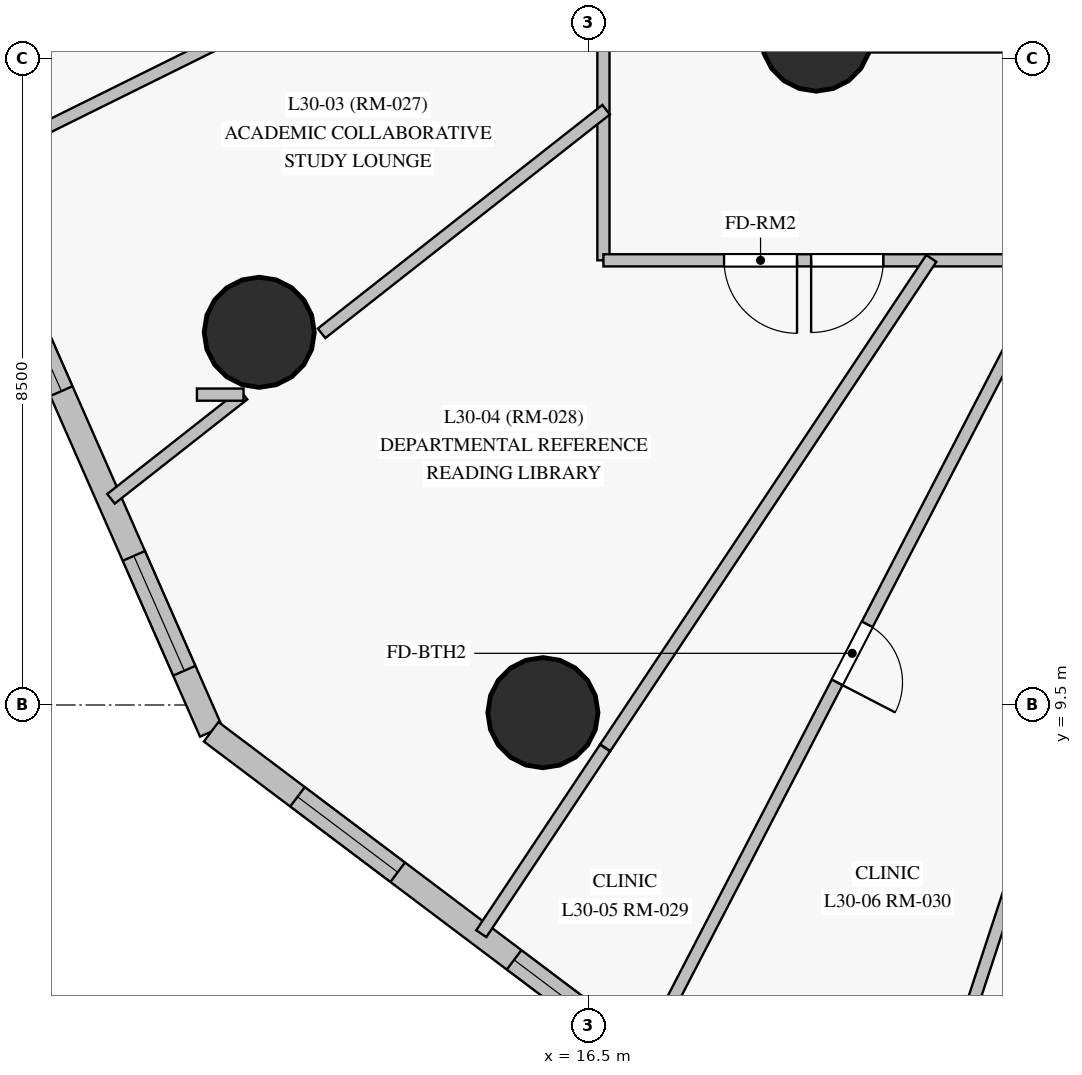
"""IFC4 building model, lengths in metres.
Left out: names, types, materials, properties, quantities, classifications, styles, units other than length and angle.
Written with IfcOpenShell. Run it as: python <this file> out.ifc"""

import sys

from ifc_helpers import new_model, si_unit, direction, frame, frame_2d, origin, origin_with_axes, origin_2d, place, context, subcontext, project, spatial, rectangle, circle, extrude, source, transform, mapped, element, fill, save


model = new_model("IFC4")
c1 = context("Model", 3, precision=1e-05, world=origin(), true_north=direction((0.0, 1.0)))
c2 = subcontext(c1, "Body", "Model", "MODEL_VIEW")
j1 = project(units=[si_unit("LENGTHUNIT", "METRE"), si_unit("PLANEANGLEUNIT", "RADIAN")], contexts=[c1])
p1 = place(None, origin())
s1 = spatial("IfcSite", under=j1, at=p1, CompositionType="ELEMENT")
p2 = place(p1, origin())
s2 = spatial("IfcBuilding", under=s1, at=p2, CompositionType="ELEMENT")
p3 = place(p2, frame((0.0, 0.0, 111.45)))
s3 = spatial("IfcBuildingStorey", under=s2, at=p3, CompositionType="ELEMENT", Elevation=111.45)
m1 = source(origin_with_axes(), c2, "Body", "SweptSolid", [
    extrude(circle(Radius=0.725, at=origin_2d()), origin(), (0.0, 0.0, 1.0), 3.05),
])
for number, where, z_axis, x_axis in (
    (1, (19.5, 18.3, 0.0), (0.0, 0.0, 1.0), (1.0, 0.0, 0.0)),
    (2, (12.172, 14.403, 0.0), (0.0, 0.0, 1.0), (1.0, 0.0, 0.0)),
    (3, (15.904, 9.399, 0.0), (0.0, 0.0, 1.0), (1.0, 0.0, 0.0)),
):
    element("IfcColumn", number, at=place(p3, frame(where, z_axis=z_axis, x_axis=x_axis)), inside=s3, PredefinedType="COLUMN", context=c2, shape_type="MappedRepresentation", body=[
        mapped(m1, transform((0.0, 0.0, 0.0), scale=1.0)),
    ])
p4 = place(p3, frame((7.619, 18.066, 0.0), z_axis=(0.0, 0.0, 1.0), x_axis=(0.402458923795, -0.915438045232, 0.0)))
e4 = element("IfcWall", 4, at=p4, inside=s3, PredefinedType="SOLIDWALL", context=c2, shape_type="SweptSolid", body=[
    extrude(rectangle(XDim=9.742, YDim=0.32, at=frame_2d((4.871, 0.0))), origin(), (0.0, 0.0, 1.0), 2.825),
])
p5 = place(p4, frame((3.197, 0.0, 0.85)))
e5 = element("IfcOpeningElement", 5, at=p5, cuts=e4, PredefinedType="OPENING", context=c2, shape_type="SweptSolid", body=[
    extrude(rectangle(XDim=1.65, YDim=1.65, at=frame_2d((0.825, 0.825))), frame((0.0, 0.17, 0.0), z_axis=(0.0, -1.0, 0.0), x_axis=(1.0, 0.0, 0.0)), (0.0, 0.0, 1.0), 0.34),
])
p6 = place(p4, frame((7.214, 0.0, 0.85)))
e6 = element("IfcOpeningElement", 6, at=p6, cuts=e4, PredefinedType="OPENING", context=c2, shape_type="SweptSolid", body=[
    extrude(rectangle(XDim=1.65, YDim=1.65, at=frame_2d((0.825, 0.825))), frame((0.0, 0.17, 0.0), z_axis=(0.0, -1.0, 0.0), x_axis=(1.0, 0.0, 0.0)), (0.0, 0.0, 1.0), 0.34),
])
p7 = place(p3, frame((11.539, 9.148, 0.0), z_axis=(0.0, 0.0, 1.0), x_axis=(0.798890081763, -0.601477046329, 0.0)))
e7 = element("IfcWall", 7, at=p7, inside=s3, PredefinedType="SOLIDWALL", context=c2, shape_type="SweptSolid", body=[
    extrude(rectangle(XDim=7.003, YDim=0.32, at=frame_2d((3.502, 0.0))), origin(), (0.0, 0.0, 1.0), 2.825),
])
p8 = place(p7, frame((1.422, 0.0, 0.85)))
e8 = element("IfcOpeningElement", 8, at=p8, cuts=e7, PredefinedType="OPENING", context=c2, shape_type="SweptSolid", body=[
    extrude(rectangle(XDim=1.65, YDim=1.65, at=frame_2d((0.825, 0.825))), frame((0.0, 0.17, 0.0), z_axis=(0.0, -1.0, 0.0), x_axis=(1.0, 0.0, 0.0)), (0.0, 0.0, 1.0), 0.34),
])
p9 = place(p7, frame((4.989, 0.0, 0.85)))
e9 = element("IfcOpeningElement", 9, at=p9, cuts=e7, PredefinedType="OPENING", context=c2, shape_type="SweptSolid", body=[
    extrude(rectangle(XDim=1.4, YDim=1.65, at=frame_2d((0.7, 0.825))), frame((0.0, 0.17, 0.0), z_axis=(0.0, -1.0, 0.0), x_axis=(1.0, 0.0, 0.0)), (0.0, 0.0, 1.0), 0.34),
])
p10 = place(p3, frame((17.134, 4.935, 0.0), z_axis=(0.0, 0.0, 1.0), x_axis=(0.996451131553, 0.084173288083, 0.0)))
e10 = element("IfcWall", 10, at=p10, inside=s3, PredefinedType="SOLIDWALL", context=c2, shape_type="SweptSolid", body=[
    extrude(rectangle(XDim=17.269, YDim=0.32, at=frame_2d((8.635, 0.0))), origin(), (0.0, 0.0, 1.0), 2.825),
])
p11 = place(p10, frame((1.446, 0.0, 0.85)))
e11 = element("IfcOpeningElement", 11, at=p11, cuts=e10, PredefinedType="OPENING", context=c2, shape_type="SweptSolid", body=[
    extrude(rectangle(XDim=1.65, YDim=1.65, at=frame_2d((0.825, 0.825))), frame((0.0, 0.17, 0.0), z_axis=(0.0, -1.0, 0.0), x_axis=(1.0, 0.0, 0.0)), (0.0, 0.0, 1.0), 0.34),
])
p12 = place(p10, frame((5.47, 0.0, 0.85)))
e12 = element("IfcOpeningElement", 12, at=p12, cuts=e10, PredefinedType="OPENING", context=c2, shape_type="SweptSolid", body=[
    extrude(rectangle(XDim=1.65, YDim=1.65, at=frame_2d((0.825, 0.825))), frame((0.0, 0.17, 0.0), z_axis=(0.0, -1.0, 0.0), x_axis=(1.0, 0.0, 0.0)), (0.0, 0.0, 1.0), 0.34),
])
p13 = place(p10, frame((15.305, 0.0, 0.0)))
e13 = element("IfcOpeningElement", 13, at=p13, cuts=e10, PredefinedType="OPENING", context=c2, shape_type="SweptSolid", body=[
    extrude(rectangle(XDim=1.05, YDim=2.12, at=frame_2d((0.525, 1.06))), frame((0.0, 0.17, 0.0), z_axis=(0.0, -1.0, 0.0), x_axis=(1.0, 0.0, 0.0)), (0.0, 0.0, 1.0), 0.34),
])
p14 = place(p3, frame((16.7, 15.35, 0.0), z_axis=(0.0, 0.0, 1.0), x_axis=(0.0, 1.0, 0.0)))
e14 = element("IfcWall", 14, at=p14, inside=s3, PredefinedType="PARTITIONING", context=c2, shape_type="SweptSolid", body=[
    extrude(rectangle(XDim=22.3, YDim=0.16, at=frame_2d((11.15, 0.0))), origin(), (0.0, 0.0, 1.0), 2.225),
])
p15 = place(p14, frame((10.635, 0.0, 0.0)))
e15 = element("IfcOpeningElement", 15, at=p15, cuts=e14, PredefinedType="OPENING", context=c2, shape_type="SweptSolid", body=[
    extrude(rectangle(XDim=0.95, YDim=2.15, at=frame_2d((0.475, 1.075))), frame((0.0, 0.09, 0.0), z_axis=(0.0, -1.0, 0.0), x_axis=(1.0, 0.0, 0.0)), (0.0, 0.0, 1.0), 0.18),
])
p16 = place(p14, frame((5.64, 0.0, 0.0)))
e16 = element("IfcOpeningElement", 16, at=p16, cuts=e14, PredefinedType="OPENING", context=c2, shape_type="SweptSolid", body=[
    extrude(rectangle(XDim=0.96, YDim=2.15, at=frame_2d((0.48, 1.075))), frame((0.0, 0.09, 0.0), z_axis=(0.0, -1.0, 0.0), x_axis=(1.0, 0.0, 0.0)), (0.0, 0.0, 1.0), 0.18),
])
p17 = place(p14, frame((3.071, 0.0, 0.0)))
e17 = element("IfcOpeningElement", 17, at=p17, cuts=e14, PredefinedType="OPENING", context=c2, shape_type="SweptSolid", body=[
    extrude(rectangle(XDim=0.95, YDim=2.15, at=frame_2d((0.475, 1.075))), frame((0.0, 0.09, 0.0), z_axis=(0.0, -1.0, 0.0), x_axis=(1.0, 0.0, 0.0)), (0.0, 0.0, 1.0), 0.18),
])
p18 = place(p14, frame((16.25, 0.0, 0.0)))
e18 = element("IfcOpeningElement", 18, at=p18, cuts=e14, PredefinedType="OPENING", context=c2, shape_type="SweptSolid", body=[
    extrude(rectangle(XDim=0.95, YDim=2.15, at=frame_2d((0.475, 1.075))), frame((0.0, 0.09, 0.0), z_axis=(0.0, -1.0, 0.0), x_axis=(1.0, 0.0, 0.0)), (0.0, 0.0, 1.0), 0.18),
])
p19 = place(p14, frame((14.02, 0.0, 0.0)))
e19 = element("IfcOpeningElement", 19, at=p19, cuts=e14, PredefinedType="OPENING", context=c2, shape_type="SweptSolid", body=[
    extrude(rectangle(XDim=0.96, YDim=2.15, at=frame_2d((0.48, 1.075))), frame((0.0, 0.09, 0.0), z_axis=(0.0, -1.0, 0.0), x_axis=(1.0, 0.0, 0.0)), (0.0, 0.0, 1.0), 0.18),
])
p20 = place(p3, frame((22.667, 15.377, 0.0), z_axis=(0.0, 0.0, 1.0), x_axis=(-0.460195420674, -0.887817647262, 0.0)))
e20 = element("IfcWall", 20, at=p20, inside=s3, PredefinedType="PARTITIONING", context=c2, shape_type="SweptSolid", body=[
    extrude(rectangle(XDim=11.708, YDim=0.16, at=frame_2d((5.854, 0.0))), origin(), (0.0, 0.0, 1.0), 2.825),
])
p21 = place(p20, frame((5.424, 0.0, 0.0)))
e21 = element("IfcOpeningElement", 21, at=p21, cuts=e20, PredefinedType="OPENING", context=c2, shape_type="SweptSolid", body=[
    extrude(rectangle(XDim=0.86, YDim=2.04, at=frame_2d((0.43, 1.02))), frame((0.0, 0.09, 0.0), z_axis=(0.0, -1.0, 0.0), x_axis=(1.0, 0.0, 0.0)), (0.0, 0.0, 1.0), 0.18),
])
p22 = place(p3, frame((27.55, 15.35, 0.0), z_axis=(0.0, 0.0, 1.0), x_axis=(-1.0, 0.0, 0.0)))
e22 = element("IfcWall", 22, at=p22, inside=s3, PredefinedType="PARTITIONING", context=c2, shape_type="SweptSolid", body=[
    extrude(rectangle(XDim=10.85, YDim=0.16, at=frame_2d((5.425, 0.0))), origin(), (0.0, 0.0, 1.0), 2.325),
])
p23 = place(p22, frame((7.167, 0.0, 0.0)))
e23 = element("IfcOpeningElement", 23, at=p23, cuts=e22, PredefinedType="OPENING", context=c2, shape_type="SweptSolid", body=[
    extrude(rectangle(XDim=0.95, YDim=2.15, at=frame_2d((0.475, 1.075))), frame((0.0, 0.09, 0.0), z_axis=(0.0, -1.0, 0.0), x_axis=(1.0, 0.0, 0.0)), (0.0, 0.0, 1.0), 0.18),
])
p24 = place(p22, frame((3.71, 0.0, 0.0)))
e24 = element("IfcOpeningElement", 24, at=p24, cuts=e22, PredefinedType="OPENING", context=c2, shape_type="SweptSolid", body=[
    extrude(rectangle(XDim=0.95, YDim=2.15, at=frame_2d((0.475, 1.075))), frame((0.0, 0.09, 0.0), z_axis=(0.0, -1.0, 0.0), x_axis=(1.0, 0.0, 0.0)), (0.0, 0.0, 1.0), 0.18),
])
p25 = place(p22, frame((1.583, 0.0, 0.0)))
e25 = element("IfcOpeningElement", 25, at=p25, cuts=e22, PredefinedType="OPENING", context=c2, shape_type="SweptSolid", body=[
    extrude(rectangle(XDim=0.95, YDim=2.15, at=frame_2d((0.475, 1.075))), frame((0.0, 0.09, 0.0), z_axis=(0.0, -1.0, 0.0), x_axis=(1.0, 0.0, 0.0)), (0.0, 0.0, 1.0), 0.18),
])
p26 = place(p22, frame((8.303, 0.0, 0.0)))
e26 = element("IfcOpeningElement", 26, at=p26, cuts=e22, PredefinedType="OPENING", context=c2, shape_type="SweptSolid", body=[
    extrude(rectangle(XDim=0.96, YDim=2.15, at=frame_2d((0.48, 1.075))), frame((0.0, 0.09, 0.0), z_axis=(0.0, -1.0, 0.0), x_axis=(1.0, 0.0, 0.0)), (0.0, 0.0, 1.0), 0.18),
])
p27 = place(p3, frame((24.785, 15.393, 0.0), z_axis=(0.0, 0.0, 1.0), x_axis=(-0.312296564034, -0.949984660977, 0.0)))
e27 = element("IfcWall", 27, at=p27, inside=s3, PredefinedType="PARTITIONING", context=c2, shape_type="SweptSolid", body=[
    extrude(rectangle(XDim=10.59, YDim=0.16, at=frame_2d((5.295, 0.0))), origin(), (0.0, 0.0, 1.0), 2.825),
])
p28 = place(p3, frame((16.727, 20.738, 0.0), z_axis=(0.0, 0.0, 1.0), x_axis=(-0.89615060854, -0.443750027396, 0.0)))
e28 = element("IfcWall", 28, at=p28, inside=s3, PredefinedType="PARTITIONING", context=c2, shape_type="SweptSolid", body=[
    extrude(rectangle(XDim=9.398, YDim=0.16, at=frame_2d((4.699, 0.0))), origin(), (0.0, 0.0, 1.0), 2.825),
])
p29 = place(p3, frame((21.014, 15.375, 0.0), z_axis=(0.0, 0.0, 1.0), x_axis=(-0.554554514282, -0.832147397214, 0.0)))
e29 = element("IfcWall", 29, at=p29, inside=s3, PredefinedType="PARTITIONING", context=c2, shape_type="SweptSolid", body=[
    extrude(rectangle(XDim=7.735, YDim=0.16, at=frame_2d((3.868, 0.0))), origin(), (0.0, 0.0, 1.0), 2.825),
])
p30 = place(p3, frame((16.735, 17.331, 0.0), z_axis=(0.0, 0.0, 1.0), x_axis=(-0.786302323137, -0.617841934987, 0.0)))
e30 = element("IfcWall", 30, at=p30, inside=s3, PredefinedType="PARTITIONING", context=c2, shape_type="SweptSolid", body=[
    extrude(rectangle(XDim=4.761, YDim=0.16, at=frame_2d((2.38, 0.0))), origin(), (0.0, 0.0, 1.0), 2.225),
])
p31 = place(p3, frame((16.721, 8.934, 0.0), z_axis=(0.0, 0.0, 1.0), x_axis=(-0.554565860438, -0.832139835867, 0.0)))
e31 = element("IfcWall", 31, at=p31, inside=s3, PredefinedType="PARTITIONING", context=c2, shape_type="SweptSolid", body=[
    extrude(rectangle(XDim=2.936, YDim=0.16, at=frame_2d((1.468, 0.0))), origin(), (0.0, 0.0, 1.0), 2.825),
])
p32 = place(p3, frame((11.965, 13.583, 0.0), z_axis=(0.0, 0.0, 1.0), x_axis=(-0.786283960073, -0.617865304198, 0.0)))
e32 = element("IfcWall", 32, at=p32, inside=s3, PredefinedType="PARTITIONING", context=c2, shape_type="SweptSolid", body=[
    extrude(rectangle(XDim=2.218, YDim=0.16, at=frame_2d((1.109, 0.0))), origin(), (0.0, 0.0, 1.0), 2.825),
])
p33 = place(p3, frame((11.352, 13.583, 0.0), z_axis=(0.0, 0.0, 1.0), x_axis=(1.0, 0.0, 0.0)))
e33 = element("IfcWall", 33, at=p33, inside=s3, PredefinedType="PARTITIONING", context=c2, shape_type="SweptSolid", body=[
    extrude(rectangle(XDim=0.613, YDim=0.16, at=frame_2d((0.307, 0.0))), origin(), (0.0, 0.0, 1.0), 2.825),
])
m2 = source(origin_with_axes(), c2, "Body", "SweptSolid", [
    extrude(rectangle(XDim=1.65, YDim=1.65, at=frame_2d((0.825, 0.825))), frame((0.0, 0.03, 0.0), z_axis=(0.0, -1.0, 0.0), x_axis=(1.0, 0.0, 0.0)), (0.0, 0.0, 1.0), 0.06),
])
p34 = place(p5, origin())
e34 = element("IfcWindow", 34, at=p34, inside=s3, PartitioningType="SINGLE_PANEL", PredefinedType="WINDOW", context=c2, shape_type="MappedRepresentation", body=[
    mapped(m2, transform((0.0, 0.0, 0.0), scale=1.0)),
])
fill(e5, e34)
p35 = place(p6, origin())
e35 = element("IfcWindow", 35, at=p35, inside=s3, PartitioningType="SINGLE_PANEL", PredefinedType="WINDOW", context=c2, shape_type="MappedRepresentation", body=[
    mapped(m2, transform((0.0, 0.0, 0.0), scale=1.0)),
])
fill(e6, e35)
p36 = place(p8, origin())
e36 = element("IfcWindow", 36, at=p36, inside=s3, PartitioningType="SINGLE_PANEL", PredefinedType="WINDOW", context=c2, shape_type="MappedRepresentation", body=[
    mapped(m2, transform((0.0, 0.0, 0.0), scale=1.0)),
])
fill(e8, e36)
m3 = source(origin_with_axes(), c2, "Body", "SweptSolid", [
    extrude(rectangle(XDim=1.4, YDim=1.65, at=frame_2d((0.7, 0.825))), frame((0.0, 0.03, 0.0), z_axis=(0.0, -1.0, 0.0), x_axis=(1.0, 0.0, 0.0)), (0.0, 0.0, 1.0), 0.06),
])
p37 = place(p9, origin())
e37 = element("IfcWindow", 37, at=p37, inside=s3, PartitioningType="SINGLE_PANEL", PredefinedType="WINDOW", context=c2, shape_type="MappedRepresentation", body=[
    mapped(m3, transform((0.0, 0.0, 0.0), scale=1.0)),
])
fill(e9, e37)
m4 = source(origin_with_axes(), c2, "Body", "SweptSolid", [
    extrude(rectangle(XDim=0.95, YDim=2.15, at=frame_2d((0.475, 1.075))), frame((0.0, 0.025, 0.0), z_axis=(0.0, -1.0, 0.0), x_axis=(1.0, 0.0, 0.0)), (0.0, 0.0, 1.0), 0.05),
])
p38 = place(p23, origin())
e38 = element("IfcDoor", 38, at=p38, inside=s3, OperationType="SINGLE_SWING_RIGHT", PredefinedType="DOOR", context=c2, shape_type="MappedRepresentation", body=[
    mapped(m4, transform((0.0, 0.0, 0.0), scale=1.0)),
])
fill(e23, e38)
m5 = source(origin_with_axes(), c2, "Body", "SweptSolid", [
    extrude(rectangle(XDim=0.96, YDim=2.15, at=frame_2d((0.48, 1.075))), frame((0.0, 0.025, 0.0), z_axis=(0.0, -1.0, 0.0), x_axis=(1.0, 0.0, 0.0)), (0.0, 0.0, 1.0), 0.05),
])
p39 = place(p26, origin())
e39 = element("IfcDoor", 39, at=p39, inside=s3, OperationType="SINGLE_SWING_LEFT", PredefinedType="DOOR", context=c2, shape_type="MappedRepresentation", body=[
    mapped(m5, transform((0.0, 0.0, 0.0), scale=1.0)),
])
fill(e26, e39)
m6 = source(origin_with_axes(), c2, "Body", "SweptSolid", [
    extrude(rectangle(XDim=0.86, YDim=2.04, at=frame_2d((0.43, 1.02))), frame((0.0, 0.025, 0.0), z_axis=(0.0, -1.0, 0.0), x_axis=(1.0, 0.0, 0.0)), (0.0, 0.0, 1.0), 0.05),
])
p40 = place(p21, origin())
e40 = element("IfcDoor", 40, at=p40, inside=s3, OperationType="SINGLE_SWING_RIGHT", PredefinedType="DOOR", context=c2, shape_type="MappedRepresentation", body=[
    mapped(m6, transform((0.0, 0.0, 0.0), scale=1.0)),
])
fill(e21, e40)
save(model, sys.argv[1])
